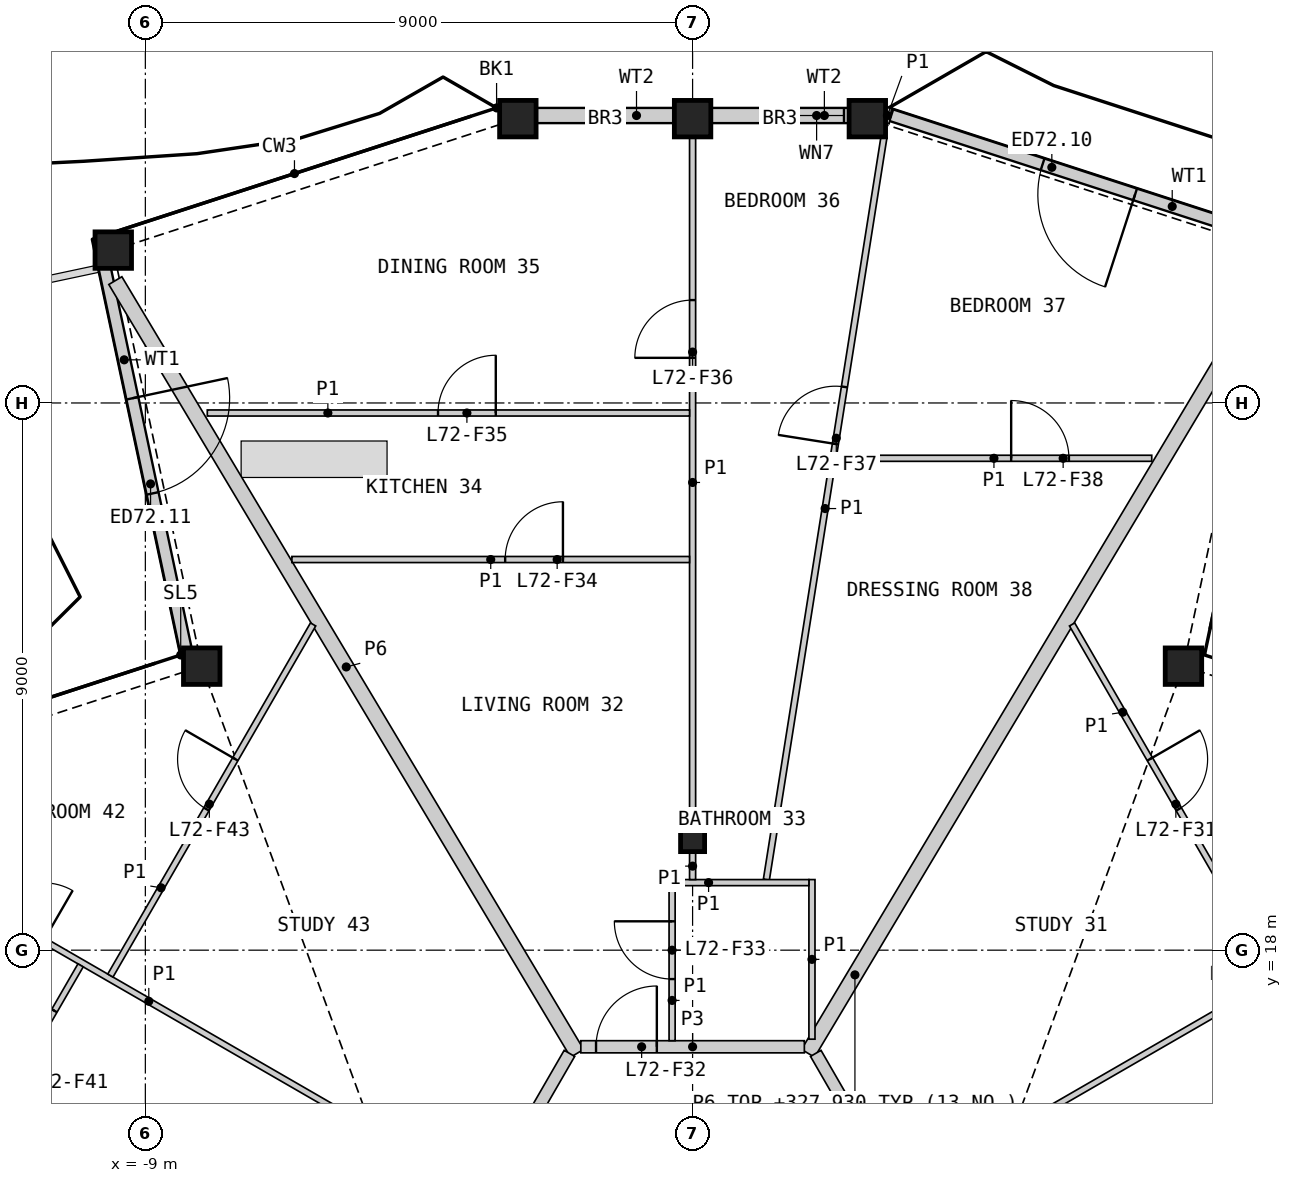
"""IFC4 building model, lengths in metres.
Left out: names, types, materials, properties, quantities, classifications, styles, units other than length and angle.
Written with IfcOpenShell. Run it as: python <this file> out.ifc"""

import sys

from ifc_helpers import new_model, si_unit, direction, frame, frame_2d, origin, origin_2d, place, context, subcontext, project, spatial, rectangle, hollow_rectangle, i_section, extrude, element, fill, save


model = new_model("IFC4")
c1 = context("Model", 3, precision=1e-05, world=origin(), true_north=direction((0.0, 1.0)))
c2 = subcontext(c1, "Body", "Model", "MODEL_VIEW")
j1 = project(units=[si_unit("LENGTHUNIT", "METRE"), si_unit("PLANEANGLEUNIT", "RADIAN")], contexts=[c1])
p1 = place(None, origin())
s1 = spatial("IfcSite", under=j1, at=p1, CompositionType="ELEMENT")
p2 = place(p1, origin())
s2 = spatial("IfcBuilding", under=s1, at=p2, CompositionType="ELEMENT")
p3 = place(p2, frame((0.0, 0.0, 325.6)))
s3 = spatial("IfcBuildingStorey", under=s2, at=p3, CompositionType="ELEMENT", Elevation=325.6)
for number, where, z_axis, x_axis in (
    (1, (8.073, 22.671, 0.0), (0.0, 0.0, 1.0), (1.0, 0.0, 0.0)),
    (2, (2.874, 31.676, 0.0), (0.0, 0.0, 1.0), (1.0, 0.0, 0.0)),
    (3, (0.0, 31.676, 0.0), (0.0, 0.0, 1.0), (1.0, 0.0, 0.0)),
    (4, (-2.874, 31.676, 0.0), (0.0, 0.0, 1.0), (1.0, 0.0, 0.0)),
    (5, (-9.527, 29.514, 0.0), (0.0, 0.0, 1.0), (1.0, 0.0, 0.0)),
    (6, (-8.073, 22.671, 0.0), (0.0, 0.0, 1.0), (1.0, 0.0, 0.0)),
):
    element("IfcColumn", number, at=place(p3, frame(where, z_axis=z_axis, x_axis=x_axis)), inside=s3, PredefinedType="COLUMN", context=c2, shape_type="SweptSolid", body=[
        extrude(hollow_rectangle(XDim=0.6, YDim=0.6, WallThickness=0.04, at=origin_2d()), origin(), (0.0, 0.0, 1.0), 3.4),
    ])
p4 = place(p3, frame((0.0, 19.811, 0.0), z_axis=(0.0, 0.0, 1.0), x_axis=(1.0, 0.0, 0.0)))
e7 = element("IfcColumn", 7, at=p4, inside=s3, PredefinedType="COLUMN", context=c2, shape_type="SweptSolid", body=[
    extrude(i_section(OverallWidth=0.396, OverallDepth=0.381, WebThickness=0.019, FlangeThickness=0.03, at=origin_2d()), origin(), (0.0, 0.0, 1.0), 3.4),
])
p5 = place(p3, frame((9.428, 29.732, 0.0), z_axis=(0.0, 0.0, 1.0), x_axis=(-0.951057057516, 0.309015328664, 0.0)))
e8 = element("IfcWall", 8, at=p5, inside=s3, PredefinedType="SOLIDWALL", context=c2, shape_type="SweptSolid", body=[
    extrude(rectangle(XDim=6.477, YDim=0.2, at=frame_2d((3.238, 0.0))), origin(), (0.0, 0.0, 1.0), 2.488),
])
p6 = place(p5, frame((2.261, 0.0, 0.0)))
e9 = element("IfcOpeningElement", 9, at=p6, cuts=e8, PredefinedType="OPENING", context=c2, shape_type="SweptSolid", body=[
    extrude(rectangle(XDim=1.6, YDim=2.25, at=frame_2d((0.8, 1.125))), frame((0.0, 0.11, 0.0), z_axis=(0.0, -1.0, 0.0), x_axis=(1.0, 0.0, 0.0)), (0.0, 0.0, 1.0), 0.22),
])
p7 = place(p3, frame((2.79, 31.728, 0.0), z_axis=(0.0, 0.0, 1.0), x_axis=(-1.0, 0.0, 0.0)))
e10 = element("IfcWall", 10, at=p7, inside=s3, PredefinedType="SOLIDWALL", context=c2, shape_type="SweptSolid", body=[
    extrude(rectangle(XDim=2.49, YDim=0.25, at=frame_2d((1.245, 0.0))), origin(), (0.0, 0.0, 1.0), 2.488),
])
p8 = place(p7, frame((0.3, 0.0, 0.4)))
e11 = element("IfcOpeningElement", 11, at=p8, cuts=e10, PredefinedType="OPENING", context=c2, shape_type="SweptSolid", body=[
    extrude(rectangle(XDim=0.9, YDim=0.6, at=frame_2d((0.45, 0.3))), frame((0.0, 0.135, 0.0), z_axis=(0.0, -1.0, 0.0), x_axis=(1.0, 0.0, 0.0)), (0.0, 0.0, 1.0), 0.27),
])
p9 = place(p3, frame((-0.3, 31.728, 0.0), z_axis=(0.0, 0.0, 1.0), x_axis=(-1.0, 0.0, 0.0)))
e12 = element("IfcWall", 12, at=p9, inside=s3, PredefinedType="SOLIDWALL", context=c2, shape_type="SweptSolid", body=[
    extrude(rectangle(XDim=2.49, YDim=0.25, at=frame_2d((1.245, 0.0))), origin(), (0.0, 0.0, 1.0), 2.488),
])
p10 = place(p3, frame((-9.684, 29.289, 0.0), z_axis=(0.0, 0.0, 1.0), x_axis=(0.207920686021, -0.978145688701, 0.0)))
e13 = element("IfcWall", 13, at=p10, inside=s3, PredefinedType="SOLIDWALL", context=c2, shape_type="SweptSolid", body=[
    extrude(rectangle(XDim=6.459, YDim=0.2, at=frame_2d((3.229, 0.0))), origin(), (0.0, 0.0, 1.0), 2.488),
])
p11 = place(p10, frame((2.261, 0.0, 0.0)))
e14 = element("IfcOpeningElement", 14, at=p11, cuts=e13, PredefinedType="OPENING", context=c2, shape_type="SweptSolid", body=[
    extrude(rectangle(XDim=1.6, YDim=2.25, at=frame_2d((0.8, 1.125))), frame((0.0, 0.11, 0.0), z_axis=(0.0, -1.0, 0.0), x_axis=(1.0, 0.0, 0.0)), (0.0, 0.0, 1.0), 0.22),
])
p12 = place(p3, frame((1.899, 16.304, 0.0), z_axis=(0.0, 0.0, 1.0), x_axis=(0.512977925681, 0.858401798556, 0.0)))
e15 = element("IfcWall", 15, at=p12, inside=s3, PredefinedType="PARTITIONING", context=c2, shape_type="SweptSolid", body=[
    extrude(rectangle(XDim=15.028, YDim=0.25, at=frame_2d((7.514, 0.0))), origin(), (0.0, 0.0, 1.0), 2.33),
])
p13 = place(p3, frame((-9.493, 29.012, 0.0), z_axis=(0.0, 0.0, 1.0), x_axis=(0.512967150926, -0.85840823742, 0.0)))
e16 = element("IfcWall", 16, at=p13, inside=s3, PredefinedType="PARTITIONING", context=c2, shape_type="SweptSolid", body=[
    extrude(rectangle(XDim=14.805, YDim=0.25, at=frame_2d((7.402, 0.0))), origin(), (0.0, 0.0, 1.0), 2.33),
])
for number, where, z_axis, x_axis in (
    (17, (2.025, 16.303, 0.0), (0.0, 0.0, 1.0), (0.5, -0.866, 0.0)),
    (18, (-4.169, 12.59, 0.0), (0.0, 0.0, 1.0), (0.5, 0.866, 0.0)),
):
    element("IfcWall", number, at=place(p3, frame(where, z_axis=z_axis, x_axis=x_axis)), inside=s3, PredefinedType="PARTITIONING", context=c2, shape_type="SweptSolid", body=[
        extrude(rectangle(XDim=4.288, YDim=0.2, at=frame_2d((2.144, 0.0))), origin(), (0.0, 0.0, 1.0), 3.1),
    ])
p14 = place(p3, frame((-1.838, 16.411, 0.0), z_axis=(0.0, 0.0, 1.0), x_axis=(1.0, 0.0, 0.0)))
e19 = element("IfcWall", 19, at=p14, inside=s3, PredefinedType="PARTITIONING", context=c2, shape_type="SweptSolid", body=[
    extrude(rectangle(XDim=3.676, YDim=0.2, at=frame_2d((1.838, 0.0))), origin(), (0.0, 0.0, 1.0), 3.1),
])
p15 = place(p14, frame((0.25, 0.0, 0.0)))
e20 = element("IfcOpeningElement", 20, at=p15, cuts=e19, PredefinedType="OPENING", context=c2, shape_type="SweptSolid", body=[
    extrude(rectangle(XDim=1.0, YDim=2.1, at=frame_2d((0.5, 1.05))), frame((0.0, 0.11, 0.0), z_axis=(0.0, -1.0, 0.0), x_axis=(1.0, 0.0, 0.0)), (0.0, 0.0, 1.0), 0.22),
])
p16 = place(p3, frame((-14.417, 20.32, 0.0), z_axis=(0.0, 0.0, 1.0), x_axis=(0.866021216079, -0.500007253249, 0.0)))
e21 = element("IfcWall", 21, at=p16, inside=s3, PredefinedType="PARTITIONING", context=c2, shape_type="SweptSolid", body=[
    extrude(rectangle(XDim=12.639, YDim=0.1, at=frame_2d((6.32, 0.0))), origin(), (0.0, 0.0, 1.0), 2.33),
])
p17 = place(p16, frame((3.375, 0.0, 0.0)))
e22 = element("IfcOpeningElement", 22, at=p17, cuts=e21, PredefinedType="OPENING", context=c2, shape_type="SweptSolid", body=[
    extrude(rectangle(XDim=0.95, YDim=2.1, at=frame_2d((0.475, 1.05))), frame((0.0, 0.06, 0.0), z_axis=(0.0, -1.0, 0.0), x_axis=(1.0, 0.0, 0.0)), (0.0, 0.0, 1.0), 0.12),
])
p18 = place(p3, frame((3.47, 14.0, 0.0), z_axis=(0.0, 0.0, 1.0), x_axis=(0.866021216079, 0.500007253249, 0.0)))
e23 = element("IfcWall", 23, at=p18, inside=s3, PredefinedType="PARTITIONING", context=c2, shape_type="SweptSolid", body=[
    extrude(rectangle(XDim=12.639, YDim=0.1, at=frame_2d((6.32, 0.0))), origin(), (0.0, 0.0, 1.0), 2.33),
])
p19 = place(p18, frame((8.314, 0.0, 0.0)))
e24 = element("IfcOpeningElement", 24, at=p19, cuts=e23, PredefinedType="OPENING", context=c2, shape_type="SweptSolid", body=[
    extrude(rectangle(XDim=0.95, YDim=2.1, at=frame_2d((0.475, 1.05))), frame((0.0, 0.06, 0.0), z_axis=(0.0, -1.0, 0.0), x_axis=(1.0, 0.0, 0.0)), (0.0, 0.0, 1.0), 0.12),
])
p20 = place(p3, frame((1.213, 19.16, 0.0), z_axis=(0.0, 0.0, 1.0), x_axis=(0.156426176129, 0.987689653394, 0.0)))
e25 = element("IfcWall", 25, at=p20, inside=s3, PredefinedType="PARTITIONING", context=c2, shape_type="SweptSolid", body=[
    extrude(rectangle(XDim=12.358, YDim=0.1, at=frame_2d((6.179, 0.0))), origin(), (0.0, 0.0, 1.0), 2.33),
])
p21 = place(p20, frame((7.255, 0.0, 0.0)))
e26 = element("IfcOpeningElement", 26, at=p21, cuts=e25, PredefinedType="OPENING", context=c2, shape_type="SweptSolid", body=[
    extrude(rectangle(XDim=0.95, YDim=2.1, at=frame_2d((0.475, 1.05))), frame((0.0, 0.06, 0.0), z_axis=(0.0, -1.0, 0.0), x_axis=(1.0, 0.0, 0.0)), (0.0, 0.0, 1.0), 0.12),
])
p22 = place(p3, frame((0.0, 20.019, 0.0), z_axis=(0.0, 0.0, 1.0), x_axis=(0.0, 1.0, 0.0)))
e27 = element("IfcWall", 27, at=p22, inside=s3, PredefinedType="PARTITIONING", context=c2, shape_type="SweptSolid", body=[
    extrude(rectangle(XDim=11.347, YDim=0.1, at=frame_2d((5.674, 0.0))), origin(), (0.0, 0.0, 1.0), 2.33),
])
p23 = place(p22, frame((7.723, 0.0, 0.0)))
e28 = element("IfcOpeningElement", 28, at=p23, cuts=e27, PredefinedType="OPENING", context=c2, shape_type="SweptSolid", body=[
    extrude(rectangle(XDim=0.95, YDim=2.1, at=frame_2d((0.475, 1.05))), frame((0.0, 0.06, 0.0), z_axis=(0.0, -1.0, 0.0), x_axis=(1.0, 0.0, 0.0)), (0.0, 0.0, 1.0), 0.12),
])
p24 = place(p3, frame((-7.981, 26.835, 0.0), z_axis=(0.0, 0.0, 1.0), x_axis=(1.0, 0.0, 0.0)))
e29 = element("IfcWall", 29, at=p24, inside=s3, PredefinedType="PARTITIONING", context=c2, shape_type="SweptSolid", body=[
    extrude(rectangle(XDim=7.931, YDim=0.1, at=frame_2d((3.966, 0.0))), origin(), (0.0, 0.0, 1.0), 2.33),
])
p25 = place(p24, frame((3.794, 0.0, 0.0)))
e30 = element("IfcOpeningElement", 30, at=p25, cuts=e29, PredefinedType="OPENING", context=c2, shape_type="SweptSolid", body=[
    extrude(rectangle(XDim=0.95, YDim=2.1, at=frame_2d((0.475, 1.05))), frame((0.0, 0.06, 0.0), z_axis=(0.0, -1.0, 0.0), x_axis=(1.0, 0.0, 0.0)), (0.0, 0.0, 1.0), 0.12),
])
p26 = place(p3, frame((6.241, 23.357, 0.0), z_axis=(0.0, 0.0, 1.0), x_axis=(0.499998189891, -0.866026448849, 0.0)))
e31 = element("IfcWall", 31, at=p26, inside=s3, PredefinedType="PARTITIONING", context=c2, shape_type="SweptSolid", body=[
    extrude(rectangle(XDim=6.668, YDim=0.1, at=frame_2d((3.334, 0.0))), origin(), (0.0, 0.0, 1.0), 2.33),
])
p27 = place(p26, frame((2.558, 0.0, 0.0)))
e32 = element("IfcOpeningElement", 32, at=p27, cuts=e31, PredefinedType="OPENING", context=c2, shape_type="SweptSolid", body=[
    extrude(rectangle(XDim=0.95, YDim=2.1, at=frame_2d((0.475, 1.05))), frame((0.0, 0.06, 0.0), z_axis=(0.0, -1.0, 0.0), x_axis=(1.0, 0.0, 0.0)), (0.0, 0.0, 1.0), 0.12),
])
p28 = place(p3, frame((-9.575, 17.583, 0.0), z_axis=(0.0, 0.0, 1.0), x_axis=(0.499998189891, 0.866026448849, 0.0)))
e33 = element("IfcWall", 33, at=p28, inside=s3, PredefinedType="PARTITIONING", context=c2, shape_type="SweptSolid", body=[
    extrude(rectangle(XDim=6.668, YDim=0.1, at=frame_2d((3.334, 0.0))), origin(), (0.0, 0.0, 1.0), 2.33),
])
p29 = place(p28, frame((3.16, 0.0, 0.0)))
e34 = element("IfcOpeningElement", 34, at=p29, cuts=e33, PredefinedType="OPENING", context=c2, shape_type="SweptSolid", body=[
    extrude(rectangle(XDim=0.95, YDim=2.1, at=frame_2d((0.475, 1.05))), frame((0.0, 0.06, 0.0), z_axis=(0.0, -1.0, 0.0), x_axis=(1.0, 0.0, 0.0)), (0.0, 0.0, 1.0), 0.12),
])
p30 = place(p3, frame((-6.59, 24.425, 0.0), z_axis=(0.0, 0.0, 1.0), x_axis=(1.0, 0.0, 0.0)))
e35 = element("IfcWall", 35, at=p30, inside=s3, PredefinedType="PARTITIONING", context=c2, shape_type="SweptSolid", body=[
    extrude(rectangle(XDim=6.54, YDim=0.1, at=frame_2d((3.27, 0.0))), origin(), (0.0, 0.0, 1.0), 2.33),
])
p31 = place(p30, frame((3.508, 0.0, 0.0)))
e36 = element("IfcOpeningElement", 36, at=p31, cuts=e35, PredefinedType="OPENING", context=c2, shape_type="SweptSolid", body=[
    extrude(rectangle(XDim=0.95, YDim=2.1, at=frame_2d((0.475, 1.05))), frame((0.0, 0.06, 0.0), z_axis=(0.0, -1.0, 0.0), x_axis=(1.0, 0.0, 0.0)), (0.0, 0.0, 1.0), 0.12),
])
p32 = place(p3, frame((2.361, 26.09, 0.0), z_axis=(0.0, 0.0, 1.0), x_axis=(1.0, 0.0, 0.0)))
e37 = element("IfcWall", 37, at=p32, inside=s3, PredefinedType="PARTITIONING", context=c2, shape_type="SweptSolid", body=[
    extrude(rectangle(XDim=5.19, YDim=0.1, at=frame_2d((2.595, 0.0))), origin(), (0.0, 0.0, 1.0), 2.33),
])
p33 = place(p32, frame((2.878, 0.0, 0.0)))
e38 = element("IfcOpeningElement", 38, at=p33, cuts=e37, PredefinedType="OPENING", context=c2, shape_type="SweptSolid", body=[
    extrude(rectangle(XDim=0.95, YDim=2.1, at=frame_2d((0.475, 1.05))), frame((0.0, 0.06, 0.0), z_axis=(0.0, -1.0, 0.0), x_axis=(1.0, 0.0, 0.0)), (0.0, 0.0, 1.0), 0.12),
])
p34 = place(p3, frame((-12.575, 13.403, 0.0), z_axis=(0.0, 0.0, 1.0), x_axis=(0.499989096993, 0.866031698547, 0.0)))
e39 = element("IfcWall", 39, at=p34, inside=s3, PredefinedType="PARTITIONING", context=c2, shape_type="SweptSolid", body=[
    extrude(rectangle(XDim=5.02, YDim=0.1, at=frame_2d((2.51, 0.0))), origin(), (0.0, 0.0, 1.0), 2.33),
])
p35 = place(p34, frame((3.208, 0.0, 0.0)))
e40 = element("IfcOpeningElement", 40, at=p35, cuts=e39, PredefinedType="OPENING", context=c2, shape_type="SweptSolid", body=[
    extrude(rectangle(XDim=0.95, YDim=2.1, at=frame_2d((0.475, 1.05))), frame((0.0, 0.06, 0.0), z_axis=(0.0, -1.0, 0.0), x_axis=(1.0, 0.0, 0.0)), (0.0, 0.0, 1.0), 0.12),
])
p36 = place(p3, frame((-0.337, 16.511, 0.0), z_axis=(0.0, 0.0, 1.0), x_axis=(0.0, 1.0, 0.0)))
e41 = element("IfcWall", 41, at=p36, inside=s3, PredefinedType="PARTITIONING", context=c2, shape_type="SweptSolid", body=[
    extrude(rectangle(XDim=2.65, YDim=0.1, at=frame_2d((1.325, 0.0))), origin(), (0.0, 0.0, 1.0), 2.33),
])
p37 = place(p36, frame((1.014, 0.0, 0.0)))
e42 = element("IfcOpeningElement", 42, at=p37, cuts=e41, PredefinedType="OPENING", context=c2, shape_type="SweptSolid", body=[
    extrude(rectangle(XDim=0.95, YDim=2.1, at=frame_2d((0.475, 1.05))), frame((0.0, 0.06, 0.0), z_axis=(0.0, -1.0, 0.0), x_axis=(1.0, 0.0, 0.0)), (0.0, 0.0, 1.0), 0.12),
])
p38 = place(p3, frame((1.963, 16.536, 0.0), z_axis=(0.0, 0.0, 1.0), x_axis=(0.0, 1.0, 0.0)))
e43 = element("IfcWall", 43, at=p38, inside=s3, PredefinedType="PARTITIONING", context=c2, shape_type="SweptSolid", body=[
    extrude(rectangle(XDim=2.625, YDim=0.1, at=frame_2d((1.312, 0.0))), origin(), (0.0, 0.0, 1.0), 2.33),
])
p39 = place(p3, frame((-0.287, 19.111, 0.0), z_axis=(0.0, 0.0, 1.0), x_axis=(1.0, 0.0, 0.0)))
e44 = element("IfcWall", 44, at=p39, inside=s3, PredefinedType="PARTITIONING", context=c2, shape_type="SweptSolid", body=[
    extrude(rectangle(XDim=2.2, YDim=0.1, at=frame_2d((1.1, 0.0))), origin(), (0.0, 0.0, 1.0), 2.33),
])
p40 = place(p3, frame((0.0, 19.161, 0.0), z_axis=(0.0, 0.0, 1.0), x_axis=(0.0, 1.0, 0.0)))
e45 = element("IfcWall", 45, at=p40, inside=s3, PredefinedType="PARTITIONING", context=c2, shape_type="SweptSolid", body=[
    extrude(rectangle(XDim=0.442, YDim=0.1, at=frame_2d((0.221, 0.0))), origin(), (0.0, 0.0, 1.0), 2.33),
])
p41 = place(p3, frame((3.184, 31.601, 0.0), z_axis=(0.0, 0.0, 1.0), x_axis=(0.156307264128, 0.987708478844, 0.0)))
e46 = element("IfcWall", 46, at=p41, inside=s3, PredefinedType="PARTITIONING", context=c2, shape_type="SweptSolid", body=[
    extrude(rectangle(XDim=0.255, YDim=0.1, at=frame_2d((0.127, 0.0))), origin(), (0.0, 0.0, 1.0), 2.33),
])
p42 = place(p6, origin())
e47 = element("IfcDoor", 47, at=p42, inside=s3, OperationType="DOUBLE_DOOR_SINGLE_SWING", PredefinedType="DOOR", context=c2, shape_type="SweptSolid", body=[
    extrude(rectangle(XDim=1.6, YDim=2.25, at=frame_2d((0.8, 1.125))), frame((0.0, 0.025, 0.0), z_axis=(0.0, -1.0, 0.0), x_axis=(1.0, 0.0, 0.0)), (0.0, 0.0, 1.0), 0.05),
])
fill(e9, e47)
p43 = place(p8, origin())
e48 = element("IfcWindow", 48, at=p43, inside=s3, PartitioningType="SINGLE_PANEL", PredefinedType="WINDOW", context=c2, shape_type="SweptSolid", body=[
    extrude(rectangle(XDim=0.9, YDim=0.6, at=frame_2d((0.45, 0.3))), frame((0.0, 0.03, 0.0), z_axis=(0.0, -1.0, 0.0), x_axis=(1.0, 0.0, 0.0)), (0.0, 0.0, 1.0), 0.06),
])
fill(e11, e48)
p44 = place(p11, origin())
e49 = element("IfcDoor", 49, at=p44, inside=s3, OperationType="DOUBLE_DOOR_SINGLE_SWING", PredefinedType="DOOR", context=c2, shape_type="SweptSolid", body=[
    extrude(rectangle(XDim=1.6, YDim=2.25, at=frame_2d((0.8, 1.125))), frame((0.0, 0.025, 0.0), z_axis=(0.0, -1.0, 0.0), x_axis=(1.0, 0.0, 0.0)), (0.0, 0.0, 1.0), 0.05),
])
fill(e14, e49)
p45 = place(p27, origin())
e50 = element("IfcDoor", 50, at=p45, inside=s3, OperationType="SINGLE_SWING_LEFT", PredefinedType="DOOR", context=c2, shape_type="SweptSolid", body=[
    extrude(rectangle(XDim=0.95, YDim=2.1, at=frame_2d((0.475, 1.05))), frame((0.0, 0.025, 0.0), z_axis=(0.0, -1.0, 0.0), x_axis=(1.0, 0.0, 0.0)), (0.0, 0.0, 1.0), 0.05),
])
fill(e32, e50)
p46 = place(p15, origin())
e51 = element("IfcDoor", 51, at=p46, inside=s3, OperationType="SINGLE_SWING_RIGHT", PredefinedType="DOOR", context=c2, shape_type="SweptSolid", body=[
    extrude(rectangle(XDim=1.0, YDim=2.1, at=frame_2d((0.5, 1.05))), frame((0.0, 0.025, 0.0), z_axis=(0.0, -1.0, 0.0), x_axis=(1.0, 0.0, 0.0)), (0.0, 0.0, 1.0), 0.05),
])
fill(e20, e51)
p47 = place(p37, origin())
e52 = element("IfcDoor", 52, at=p47, inside=s3, OperationType="SINGLE_SWING_RIGHT", PredefinedType="DOOR", context=c2, shape_type="SweptSolid", body=[
    extrude(rectangle(XDim=0.95, YDim=2.1, at=frame_2d((0.475, 1.05))), frame((0.0, 0.025, 0.0), z_axis=(0.0, -1.0, 0.0), x_axis=(1.0, 0.0, 0.0)), (0.0, 0.0, 1.0), 0.05),
])
fill(e42, e52)
p48 = place(p31, origin())
e53 = element("IfcDoor", 53, at=p48, inside=s3, OperationType="SINGLE_SWING_RIGHT", PredefinedType="DOOR", context=c2, shape_type="SweptSolid", body=[
    extrude(rectangle(XDim=0.95, YDim=2.1, at=frame_2d((0.475, 1.05))), frame((0.0, 0.025, 0.0), z_axis=(0.0, -1.0, 0.0), x_axis=(1.0, 0.0, 0.0)), (0.0, 0.0, 1.0), 0.05),
])
fill(e36, e53)
p49 = place(p25, origin())
e54 = element("IfcDoor", 54, at=p49, inside=s3, OperationType="SINGLE_SWING_RIGHT", PredefinedType="DOOR", context=c2, shape_type="SweptSolid", body=[
    extrude(rectangle(XDim=0.95, YDim=2.1, at=frame_2d((0.475, 1.05))), frame((0.0, 0.025, 0.0), z_axis=(0.0, -1.0, 0.0), x_axis=(1.0, 0.0, 0.0)), (0.0, 0.0, 1.0), 0.05),
])
fill(e30, e54)
p50 = place(p23, origin())
e55 = element("IfcDoor", 55, at=p50, inside=s3, OperationType="SINGLE_SWING_LEFT", PredefinedType="DOOR", context=c2, shape_type="SweptSolid", body=[
    extrude(rectangle(XDim=0.95, YDim=2.1, at=frame_2d((0.475, 1.05))), frame((0.0, 0.025, 0.0), z_axis=(0.0, -1.0, 0.0), x_axis=(1.0, 0.0, 0.0)), (0.0, 0.0, 1.0), 0.05),
])
fill(e28, e55)
p51 = place(p21, origin())
e56 = element("IfcDoor", 56, at=p51, inside=s3, OperationType="SINGLE_SWING_LEFT", PredefinedType="DOOR", context=c2, shape_type="SweptSolid", body=[
    extrude(rectangle(XDim=0.95, YDim=2.1, at=frame_2d((0.475, 1.05))), frame((0.0, 0.025, 0.0), z_axis=(0.0, -1.0, 0.0), x_axis=(1.0, 0.0, 0.0)), (0.0, 0.0, 1.0), 0.05),
])
fill(e26, e56)
p52 = place(p33, origin())
e57 = element("IfcDoor", 57, at=p52, inside=s3, OperationType="SINGLE_SWING_LEFT", PredefinedType="DOOR", context=c2, shape_type="SweptSolid", body=[
    extrude(rectangle(XDim=0.95, YDim=2.1, at=frame_2d((0.475, 1.05))), frame((0.0, 0.025, 0.0), z_axis=(0.0, -1.0, 0.0), x_axis=(1.0, 0.0, 0.0)), (0.0, 0.0, 1.0), 0.05),
])
fill(e38, e57)
p53 = place(p35, origin())
e58 = element("IfcDoor", 58, at=p53, inside=s3, OperationType="SINGLE_SWING_RIGHT", PredefinedType="DOOR", context=c2, shape_type="SweptSolid", body=[
    extrude(rectangle(XDim=0.95, YDim=2.1, at=frame_2d((0.475, 1.05))), frame((0.0, 0.025, 0.0), z_axis=(0.0, -1.0, 0.0), x_axis=(1.0, 0.0, 0.0)), (0.0, 0.0, 1.0), 0.05),
])
fill(e40, e58)
p54 = place(p29, origin())
e59 = element("IfcDoor", 59, at=p54, inside=s3, OperationType="SINGLE_SWING_RIGHT", PredefinedType="DOOR", context=c2, shape_type="SweptSolid", body=[
    extrude(rectangle(XDim=0.95, YDim=2.1, at=frame_2d((0.475, 1.05))), frame((0.0, 0.025, 0.0), z_axis=(0.0, -1.0, 0.0), x_axis=(1.0, 0.0, 0.0)), (0.0, 0.0, 1.0), 0.05),
])
fill(e34, e59)
save(model, sys.argv[1])
